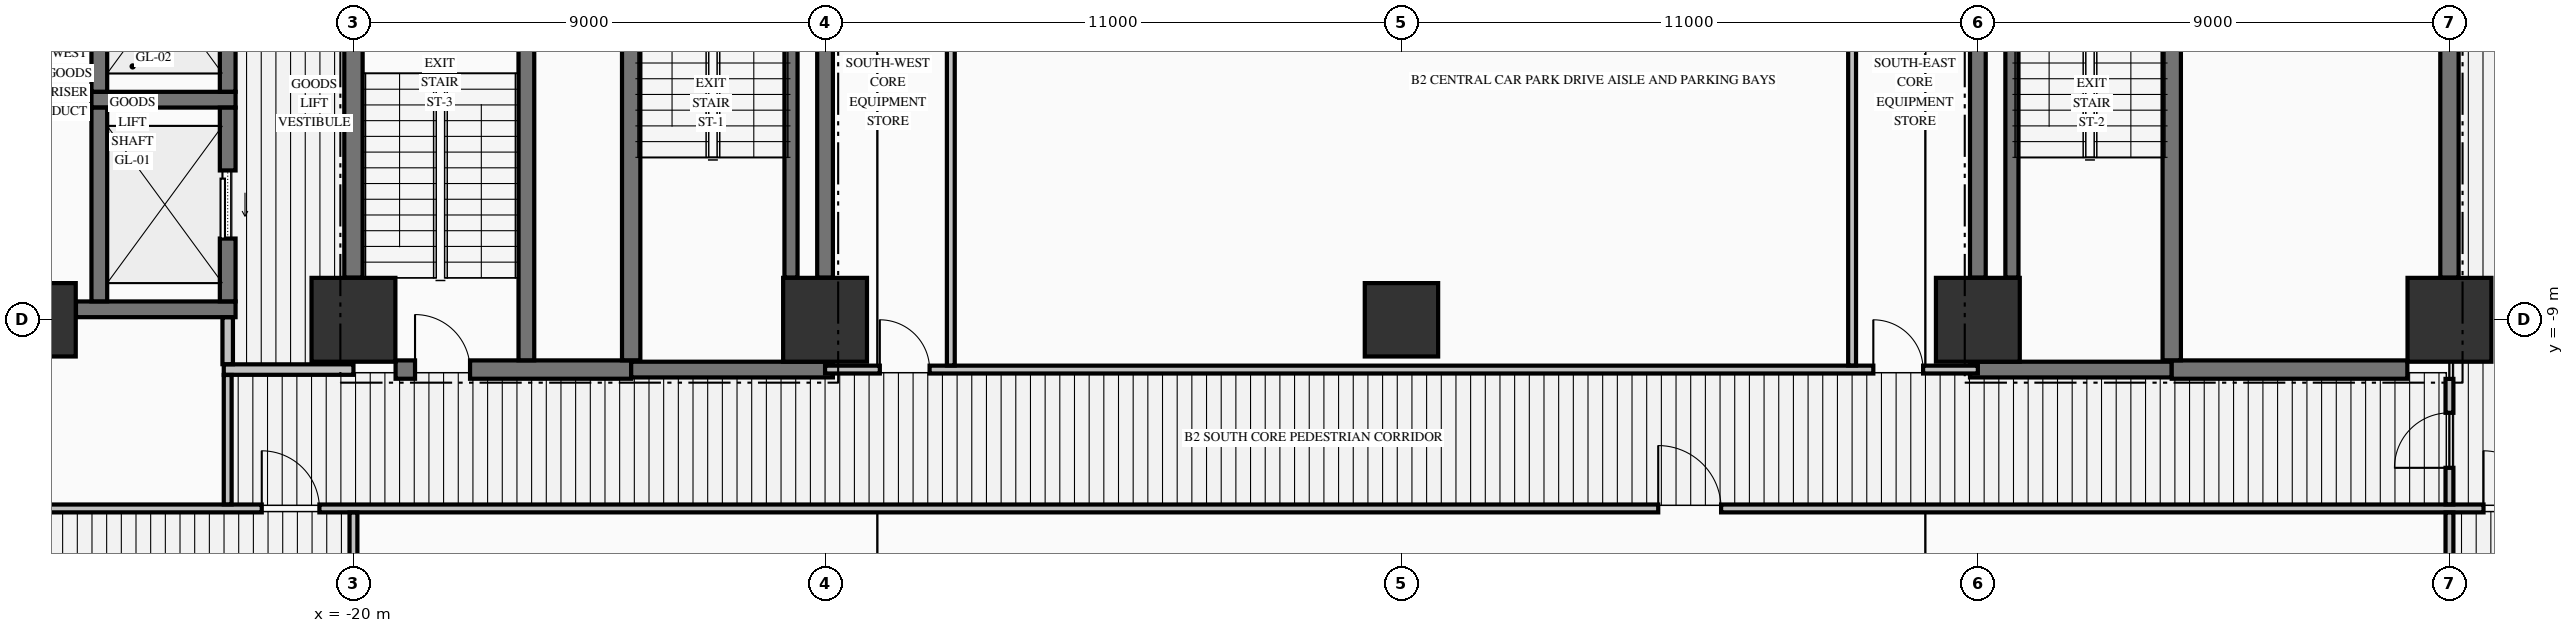
"""IFC4 building model, lengths in metres.
Left out: names, types, materials, properties, quantities, classifications, styles, units other than length and angle.
Written with IfcOpenShell. Run it as: python <this file> out.ifc"""

import sys

from ifc_helpers import new_model, si_unit, direction, frame, frame_2d, origin, origin_2d, place, context, subcontext, project, spatial, rectangle, extrude, element, fill, save


model = new_model("IFC4")
c1 = context("Model", 3, precision=1e-05, world=origin(), true_north=direction((0.0, 1.0)))
c2 = subcontext(c1, "Body", "Model", "MODEL_VIEW")
j1 = project(units=[si_unit("LENGTHUNIT", "METRE"), si_unit("PLANEANGLEUNIT", "RADIAN")], contexts=[c1])
p1 = place(None, origin())
s1 = spatial("IfcSite", under=j1, at=p1, CompositionType="ELEMENT")
p2 = place(p1, origin())
s2 = spatial("IfcBuilding", under=s1, at=p2, CompositionType="ELEMENT")
p3 = place(p2, frame((0.0, 0.0, -9.1)))
s3 = spatial("IfcBuildingStorey", under=s2, at=p3, CompositionType="ELEMENT", Elevation=-9.1)
p4 = place(p3, frame((-26.0, -9.0, -0.45), z_axis=(0.0, 0.0, 1.0), x_axis=(1.0, 0.0, 0.0)))
e1 = element("IfcColumn", 1, at=p4, inside=s3, PredefinedType="COLUMN", context=c2, shape_type="SweptSolid", body=[
    extrude(rectangle(XDim=1.4, YDim=1.4, at=origin_2d()), origin(), (0.0, 0.0, 1.0), 4.65),
])
for number, where, z_axis, x_axis in (
    (2, (-20.0, -9.0, -0.45), (0.0, 0.0, 1.0), (1.0, 0.0, 0.0)),
    (3, (-11.0, -9.0, -0.45), (0.0, 0.0, 1.0), (1.0, 0.0, 0.0)),
):
    element("IfcColumn", number, at=place(p3, frame(where, z_axis=z_axis, x_axis=x_axis)), inside=s3, PredefinedType="COLUMN", context=c2, shape_type="SweptSolid", body=[
        extrude(rectangle(XDim=1.6, YDim=1.6, at=origin_2d()), origin(), (0.0, 0.0, 1.0), 4.65),
    ])
p5 = place(p3, frame((0.0, -9.0, -0.45), z_axis=(0.0, 0.0, 1.0), x_axis=(1.0, 0.0, 0.0)))
e4 = element("IfcColumn", 4, at=p5, inside=s3, PredefinedType="COLUMN", context=c2, shape_type="SweptSolid", body=[
    extrude(rectangle(XDim=1.4, YDim=1.4, at=origin_2d()), origin(), (0.0, 0.0, 1.0), 4.65),
])
for number, where, z_axis, x_axis in (
    (5, (11.0, -9.0, -0.45), (0.0, 0.0, 1.0), (1.0, 0.0, 0.0)),
    (6, (20.0, -9.0, -0.45), (0.0, 0.0, 1.0), (1.0, 0.0, 0.0)),
):
    element("IfcColumn", number, at=place(p3, frame(where, z_axis=z_axis, x_axis=x_axis)), inside=s3, PredefinedType="COLUMN", context=c2, shape_type="SweptSolid", body=[
        extrude(rectangle(XDim=1.6, YDim=1.6, at=origin_2d()), origin(), (0.0, 0.0, 1.0), 4.65),
    ])
p6 = place(p3, frame((-19.196, -9.95, 0.0), z_axis=(0.0, 0.0, 1.0), x_axis=(1.0, 0.0, 0.0)))
e7 = element("IfcWall", 7, at=p6, inside=s3, PredefinedType="SHEAR", context=c2, shape_type="SweptSolid", body=[
    extrude(rectangle(XDim=4.496, YDim=0.35, at=frame_2d((2.248, 0.0))), origin(), (0.0, 0.0, 1.0), 4.2),
])
p7 = place(p6, frame((0.371, 0.0, 0.0)))
e8 = element("IfcOpeningElement", 8, at=p7, cuts=e7, PredefinedType="OPENING", context=c2, shape_type="SweptSolid", body=[
    extrude(rectangle(XDim=1.05, YDim=2.15, at=frame_2d((0.525, 1.075))), frame((0.0, 0.185, 0.0), z_axis=(0.0, -1.0, 0.0), x_axis=(1.0, 0.0, 0.0)), (0.0, 0.0, 1.0), 0.37),
])
for number, where, z_axis, x_axis in (
    (9, (-14.7, -9.95, 0.0), (0.0, 0.0, 1.0), (1.0, 0.0, 0.0)),
    (10, (10.85, -9.95, 0.0), (0.0, 0.0, 1.0), (1.0, 0.0, 0.0)),
):
    element("IfcWall", number, at=place(p3, frame(where, z_axis=z_axis, x_axis=x_axis)), inside=s3, PredefinedType="SHEAR", context=c2, shape_type="SweptSolid", body=[
        extrude(rectangle(XDim=3.85, YDim=0.3, at=frame_2d((1.925, 0.0))), origin(), (0.0, 0.0, 1.0), 4.2),
    ])
p8 = place(p3, frame((14.7, -9.95, 0.0), z_axis=(0.0, 0.0, 1.0), x_axis=(1.0, 0.0, 0.0)))
e11 = element("IfcWall", 11, at=p8, inside=s3, PredefinedType="SHEAR", context=c2, shape_type="SweptSolid", body=[
    extrude(rectangle(XDim=4.496, YDim=0.35, at=frame_2d((2.248, 0.0))), origin(), (0.0, 0.0, 1.0), 4.2),
])
p9 = place(p3, frame((-25.296, -8.8, 0.0), z_axis=(0.0, 0.0, 1.0), x_axis=(1.0, 0.0, 0.0)))
e12 = element("IfcWall", 12, at=p9, inside=s3, PredefinedType="SHEAR", context=c2, shape_type="SweptSolid", body=[
    extrude(rectangle(XDim=3.046, YDim=0.3, at=frame_2d((1.523, 0.0))), origin(), (0.0, 0.0, 1.0), 4.2),
])
p10 = place(p3, frame((-25.0, -4.8, 0.0), z_axis=(0.0, 0.0, 1.0), x_axis=(1.0, 0.0, 0.0)))
e13 = element("IfcWall", 13, at=p10, inside=s3, PredefinedType="SHEAR", context=c2, shape_type="SweptSolid", body=[
    extrude(rectangle(XDim=2.75, YDim=0.3, at=frame_2d((1.375, 0.0))), origin(), (0.0, 0.0, 1.0), 4.2),
])
p11 = place(p3, frame((-33.722, -12.6, 0.0), z_axis=(0.0, 0.0, 1.0), x_axis=(1.0, 0.0, 0.0)))
e14 = element("IfcWall", 14, at=p11, inside=s3, PredefinedType="PARTITIONING", context=c2, shape_type="SweptSolid", body=[
    extrude(rectangle(XDim=56.222, YDim=0.15, at=frame_2d((28.111, 0.0))), origin(), (0.0, 0.0, 1.0), 3.74),
])
p12 = place(p11, frame((11.972, 0.0, 0.0)))
e15 = element("IfcOpeningElement", 15, at=p12, cuts=e14, PredefinedType="OPENING", context=c2, shape_type="SweptSolid", body=[
    extrude(rectangle(XDim=1.1, YDim=2.15, at=frame_2d((0.55, 1.075))), frame((0.0, 0.085, 0.0), z_axis=(0.0, -1.0, 0.0), x_axis=(1.0, 0.0, 0.0)), (0.0, 0.0, 1.0), 0.17),
])
p13 = place(p11, frame((54.372, 0.0, 0.0)))
e16 = element("IfcOpeningElement", 16, at=p13, cuts=e14, PredefinedType="OPENING", context=c2, shape_type="SweptSolid", body=[
    extrude(rectangle(XDim=1.1, YDim=2.15, at=frame_2d((0.55, 1.075))), frame((0.0, 0.085, 0.0), z_axis=(0.0, -1.0, 0.0), x_axis=(1.0, 0.0, 0.0)), (0.0, 0.0, 1.0), 0.17),
])
p14 = place(p11, frame((38.622, 0.0, 0.0)))
e17 = element("IfcOpeningElement", 17, at=p14, cuts=e14, PredefinedType="OPENING", context=c2, shape_type="SweptSolid", body=[
    extrude(rectangle(XDim=1.2, YDim=2.15, at=frame_2d((0.6, 1.075))), frame((0.0, 0.085, 0.0), z_axis=(0.0, -1.0, 0.0), x_axis=(1.0, 0.0, 0.0)), (0.0, 0.0, 1.0), 0.17),
])
p15 = place(p3, frame((-22.475, -9.95, 0.0), z_axis=(0.0, 0.0, 1.0), x_axis=(1.0, 0.0, 0.0)))
e18 = element("IfcWall", 18, at=p15, inside=s3, PredefinedType="PARTITIONING", context=c2, shape_type="SweptSolid", body=[
    extrude(rectangle(XDim=2.475, YDim=0.2, at=frame_2d((1.238, 0.0))), origin(), (0.0, 0.0, 1.0), 4.2),
])
p16 = place(p3, frame((-11.0, -9.95, 0.0), z_axis=(0.0, 0.0, 1.0), x_axis=(1.0, 0.0, 0.0)))
e19 = element("IfcWall", 19, at=p16, inside=s3, PredefinedType="PARTITIONING", context=c2, shape_type="SweptSolid", body=[
    extrude(rectangle(XDim=22.0, YDim=0.15, at=frame_2d((11.0, 0.0))), origin(), (0.0, 0.0, 1.0), 4.2),
])
p17 = place(p16, frame((1.045, 0.0, 0.0)))
e20 = element("IfcOpeningElement", 20, at=p17, cuts=e19, PredefinedType="OPENING", context=c2, shape_type="SweptSolid", body=[
    extrude(rectangle(XDim=0.95, YDim=2.15, at=frame_2d((0.475, 1.075))), frame((0.0, 0.085, 0.0), z_axis=(0.0, -1.0, 0.0), x_axis=(1.0, 0.0, 0.0)), (0.0, 0.0, 1.0), 0.17),
])
p18 = place(p16, frame((20.005, 0.0, 0.0)))
e21 = element("IfcOpeningElement", 21, at=p18, cuts=e19, PredefinedType="OPENING", context=c2, shape_type="SweptSolid", body=[
    extrude(rectangle(XDim=0.95, YDim=2.15, at=frame_2d((0.475, 1.075))), frame((0.0, 0.085, 0.0), z_axis=(0.0, -1.0, 0.0), x_axis=(1.0, 0.0, 0.0)), (0.0, 0.0, 1.0), 0.17),
])
for number, where, z_axis, x_axis in (
    (22, (-24.85, -8.648, 0.0), (0.0, 0.0, 1.0), (0.0, 1.0, 0.0)),
    (23, (-24.85, -4.648, 0.0), (0.0, 0.0, 1.0), (0.0, 1.0, 0.0)),
):
    element("IfcWall", number, at=place(p3, frame(where, z_axis=z_axis, x_axis=x_axis)), inside=s3, PredefinedType="SHEAR", context=c2, shape_type="SweptSolid", body=[
        extrude(rectangle(XDim=3.696, YDim=0.3, at=frame_2d((1.848, 0.0))), origin(), (0.0, 0.0, 1.0), 4.2),
    ])
p19 = place(p3, frame((-22.4, -8.648, 0.0), z_axis=(0.0, 0.0, 1.0), x_axis=(0.0, 1.0, 0.0)))
e24 = element("IfcWall", 24, at=p19, inside=s3, PredefinedType="SHEAR", context=c2, shape_type="SweptSolid", body=[
    extrude(rectangle(XDim=3.696, YDim=0.3, at=frame_2d((1.848, 0.0))), origin(), (0.0, 0.0, 1.0), 4.2),
])
p20 = place(p19, frame((1.198, 0.0, 0.0)))
e25 = element("IfcOpeningElement", 25, at=p20, cuts=e24, PredefinedType="OPENING", context=c2, shape_type="SweptSolid", body=[
    extrude(rectangle(XDim=1.3, YDim=2.3, at=frame_2d((0.65, 1.15))), frame((0.0, 0.16, 0.0), z_axis=(0.0, -1.0, 0.0), x_axis=(1.0, 0.0, 0.0)), (0.0, 0.0, 1.0), 0.32),
])
p21 = place(p3, frame((-22.4, -4.648, 0.0), z_axis=(0.0, 0.0, 1.0), x_axis=(0.0, 1.0, 0.0)))
e26 = element("IfcWall", 26, at=p21, inside=s3, PredefinedType="SHEAR", context=c2, shape_type="SweptSolid", body=[
    extrude(rectangle(XDim=3.696, YDim=0.3, at=frame_2d((1.848, 0.0))), origin(), (0.0, 0.0, 1.0), 4.2),
])
p22 = place(p21, frame((1.198, 0.0, 0.0)))
e27 = element("IfcOpeningElement", 27, at=p22, cuts=e26, PredefinedType="OPENING", context=c2, shape_type="SweptSolid", body=[
    extrude(rectangle(XDim=1.3, YDim=2.3, at=frame_2d((0.65, 1.15))), frame((0.0, 0.16, 0.0), z_axis=(0.0, -1.0, 0.0), x_axis=(1.0, 0.0, 0.0)), (0.0, 0.0, 1.0), 0.32),
])
p23 = place(p3, frame((-20.0, -8.196, 0.0), z_axis=(0.0, 0.0, 1.0), x_axis=(0.0, 1.0, 0.0)))
e28 = element("IfcWall", 28, at=p23, inside=s3, PredefinedType="SHEAR", context=c2, shape_type="SweptSolid", body=[
    extrude(rectangle(XDim=7.392, YDim=0.35, at=frame_2d((3.696, 0.0))), origin(), (0.0, 0.0, 1.0), 4.2),
])
p24 = place(p3, frame((-16.7, -9.773, 0.0), z_axis=(0.0, 0.0, 1.0), x_axis=(0.0, 1.0, 0.0)))
e29 = element("IfcWall", 29, at=p24, inside=s3, PredefinedType="SHEAR", context=c2, shape_type="SweptSolid", body=[
    extrude(rectangle(XDim=9.371, YDim=0.3, at=frame_2d((4.686, 0.0))), origin(), (0.0, 0.0, 1.0), 4.2),
])
p25 = place(p3, frame((-14.7, -9.773, 0.0), z_axis=(0.0, 0.0, 1.0), x_axis=(0.0, 1.0, 0.0)))
e30 = element("IfcWall", 30, at=p25, inside=s3, PredefinedType="SHEAR", context=c2, shape_type="SweptSolid", body=[
    extrude(rectangle(XDim=9.371, YDim=0.35, at=frame_2d((4.686, 0.0))), origin(), (0.0, 0.0, 1.0), 4.2),
])
p26 = place(p3, frame((-11.65, -8.196, 0.0), z_axis=(0.0, 0.0, 1.0), x_axis=(0.0, 1.0, 0.0)))
e31 = element("IfcWall", 31, at=p26, inside=s3, PredefinedType="SOLIDWALL", context=c2, shape_type="SweptSolid", body=[
    extrude(rectangle(XDim=7.392, YDim=0.25, at=frame_2d((3.696, 0.0))), origin(), (0.0, 0.0, 1.0), 4.2),
])
for number, where, z_axis, x_axis in (
    (32, (-11.0, -8.196, 0.0), (0.0, 0.0, 1.0), (0.0, 1.0, 0.0)),
    (33, (11.0, -8.196, 0.0), (0.0, 0.0, 1.0), (0.0, 1.0, 0.0)),
):
    element("IfcWall", number, at=place(p3, frame(where, z_axis=z_axis, x_axis=x_axis)), inside=s3, PredefinedType="SHEAR", context=c2, shape_type="SweptSolid", body=[
        extrude(rectangle(XDim=7.392, YDim=0.3, at=frame_2d((3.696, 0.0))), origin(), (0.0, 0.0, 1.0), 4.2),
    ])
p27 = place(p3, frame((11.65, -8.196, 0.0), z_axis=(0.0, 0.0, 1.0), x_axis=(0.0, 1.0, 0.0)))
e34 = element("IfcWall", 34, at=p27, inside=s3, PredefinedType="SOLIDWALL", context=c2, shape_type="SweptSolid", body=[
    extrude(rectangle(XDim=7.392, YDim=0.25, at=frame_2d((3.696, 0.0))), origin(), (0.0, 0.0, 1.0), 4.2),
])
p28 = place(p3, frame((14.7, -9.773, 0.0), z_axis=(0.0, 0.0, 1.0), x_axis=(0.0, 1.0, 0.0)))
e35 = element("IfcWall", 35, at=p28, inside=s3, PredefinedType="SHEAR", context=c2, shape_type="SweptSolid", body=[
    extrude(rectangle(XDim=9.371, YDim=0.35, at=frame_2d((4.686, 0.0))), origin(), (0.0, 0.0, 1.0), 4.2),
])
p29 = place(p3, frame((20.0, -8.196, 0.0), z_axis=(0.0, 0.0, 1.0), x_axis=(0.0, 1.0, 0.0)))
e36 = element("IfcWall", 36, at=p29, inside=s3, PredefinedType="SHEAR", context=c2, shape_type="SweptSolid", body=[
    extrude(rectangle(XDim=7.392, YDim=0.35, at=frame_2d((3.696, 0.0))), origin(), (0.0, 0.0, 1.0), 4.2),
])
p30 = place(p3, frame((-22.4, -12.522, 0.0), z_axis=(0.0, 0.0, 1.0), x_axis=(0.0, 1.0, 0.0)))
e37 = element("IfcWall", 37, at=p30, inside=s3, PredefinedType="PARTITIONING", context=c2, shape_type="SweptSolid", body=[
    extrude(rectangle(XDim=2.469, YDim=0.15, at=frame_2d((1.234, 0.0))), origin(), (0.0, 0.0, 1.0), 4.2),
])
p31 = place(p3, frame((-22.4, -9.847, 0.0), z_axis=(0.0, 0.0, 1.0), x_axis=(0.0, 1.0, 0.0)))
e38 = element("IfcWall", 38, at=p31, inside=s3, PredefinedType="PARTITIONING", context=c2, shape_type="SweptSolid", body=[
    extrude(rectangle(XDim=0.894, YDim=0.2, at=frame_2d((0.447, 0.0))), origin(), (0.0, 0.0, 1.0), 4.2),
])
p32 = place(p3, frame((-20.0, -15.194, 0.0), z_axis=(0.0, 0.0, 1.0), x_axis=(0.0, 1.0, 0.0)))
e39 = element("IfcWall", 39, at=p32, inside=s3, PredefinedType="PARTITIONING", context=c2, shape_type="SweptSolid", body=[
    extrude(rectangle(XDim=2.516, YDim=0.15, at=frame_2d((1.258, 0.0))), origin(), (0.0, 0.0, 1.0), 4.2),
])
for number, where, z_axis, x_axis in (
    (40, (-8.6, -9.872, 0.0), (0.0, 0.0, 1.0), (0.0, 1.0, 0.0)),
    (41, (8.6, -9.872, 0.0), (0.0, 0.0, 1.0), (0.0, 1.0, 0.0)),
):
    element("IfcWall", number, at=place(p3, frame(where, z_axis=z_axis, x_axis=x_axis)), inside=s3, PredefinedType="PARTITIONING", context=c2, shape_type="SweptSolid", body=[
        extrude(rectangle(XDim=9.266, YDim=0.15, at=frame_2d((4.633, 0.0))), origin(), (0.0, 0.0, 1.0), 4.2),
    ])
p33 = place(p3, frame((20.0, -15.194, 0.0), z_axis=(0.0, 0.0, 1.0), x_axis=(0.0, 1.0, 0.0)))
e42 = element("IfcWall", 42, at=p33, inside=s3, PredefinedType="PARTITIONING", context=c2, shape_type="SweptSolid", body=[
    extrude(rectangle(XDim=2.516, YDim=0.15, at=frame_2d((1.258, 0.0))), origin(), (0.0, 0.0, 1.0), 3.242),
])
p34 = place(p3, frame((20.0, -12.522, 0.0), z_axis=(0.0, 0.0, 1.0), x_axis=(0.0, 1.0, 0.0)))
e43 = element("IfcWall", 43, at=p34, inside=s3, PredefinedType="PARTITIONING", context=c2, shape_type="SweptSolid", body=[
    extrude(rectangle(XDim=2.394, YDim=0.15, at=frame_2d((1.197, 0.0))), origin(), (0.0, 0.0, 1.0), 3.242),
])
p35 = place(p34, frame((0.697, 0.0, 0.0)))
e44 = element("IfcOpeningElement", 44, at=p35, cuts=e43, PredefinedType="OPENING", context=c2, shape_type="SweptSolid", body=[
    extrude(rectangle(XDim=1.05, YDim=2.15, at=frame_2d((0.525, 1.075))), frame((0.0, 0.085, 0.0), z_axis=(0.0, -1.0, 0.0), x_axis=(1.0, 0.0, 0.0)), (0.0, 0.0, 1.0), 0.17),
])
p36 = place(p7, origin())
e45 = element("IfcDoor", 45, at=p36, inside=s3, OperationType="SINGLE_SWING_LEFT", PredefinedType="DOOR", context=c2, shape_type="SweptSolid", body=[
    extrude(rectangle(XDim=1.05, YDim=2.15, at=frame_2d((0.525, 1.075))), frame((0.0, 0.025, 0.0), z_axis=(0.0, -1.0, 0.0), x_axis=(1.0, 0.0, 0.0)), (0.0, 0.0, 1.0), 0.05),
])
fill(e8, e45)
p37 = place(p20, origin())
e46 = element("IfcDoor", 46, at=p37, inside=s3, OperationType="SLIDING_TO_LEFT", PredefinedType="DOOR", context=c2, shape_type="SweptSolid", body=[
    extrude(rectangle(XDim=1.3, YDim=2.3, at=frame_2d((0.65, 1.15))), frame((0.0, 0.025, 0.0), z_axis=(0.0, -1.0, 0.0), x_axis=(1.0, 0.0, 0.0)), (0.0, 0.0, 1.0), 0.05),
])
fill(e25, e46)
p38 = place(p17, origin())
e47 = element("IfcDoor", 47, at=p38, inside=s3, OperationType="SINGLE_SWING_LEFT", PredefinedType="DOOR", context=c2, shape_type="SweptSolid", body=[
    extrude(rectangle(XDim=0.95, YDim=2.15, at=frame_2d((0.475, 1.075))), frame((0.0, 0.025, 0.0), z_axis=(0.0, -1.0, 0.0), x_axis=(1.0, 0.0, 0.0)), (0.0, 0.0, 1.0), 0.05),
])
fill(e20, e47)
p39 = place(p18, origin())
e48 = element("IfcDoor", 48, at=p39, inside=s3, OperationType="SINGLE_SWING_LEFT", PredefinedType="DOOR", context=c2, shape_type="SweptSolid", body=[
    extrude(rectangle(XDim=0.95, YDim=2.15, at=frame_2d((0.475, 1.075))), frame((0.0, 0.025, 0.0), z_axis=(0.0, -1.0, 0.0), x_axis=(1.0, 0.0, 0.0)), (0.0, 0.0, 1.0), 0.05),
])
fill(e21, e48)
p40 = place(p12, origin())
e49 = element("IfcDoor", 49, at=p40, inside=s3, OperationType="SINGLE_SWING_LEFT", PredefinedType="DOOR", context=c2, shape_type="SweptSolid", body=[
    extrude(rectangle(XDim=1.1, YDim=2.15, at=frame_2d((0.55, 1.075))), frame((0.0, 0.025, 0.0), z_axis=(0.0, -1.0, 0.0), x_axis=(1.0, 0.0, 0.0)), (0.0, 0.0, 1.0), 0.05),
])
fill(e15, e49)
p41 = place(p35, origin())
e50 = element("IfcDoor", 50, at=p41, inside=s3, OperationType="SINGLE_SWING_LEFT", PredefinedType="DOOR", context=c2, shape_type="SweptSolid", body=[
    extrude(rectangle(XDim=1.05, YDim=2.15, at=frame_2d((0.525, 1.075))), frame((0.0, 0.025, 0.0), z_axis=(0.0, -1.0, 0.0), x_axis=(1.0, 0.0, 0.0)), (0.0, 0.0, 1.0), 0.05),
])
fill(e44, e50)
p42 = place(p13, origin())
e51 = element("IfcDoor", 51, at=p42, inside=s3, OperationType="SINGLE_SWING_LEFT", PredefinedType="DOOR", context=c2, shape_type="SweptSolid", body=[
    extrude(rectangle(XDim=1.1, YDim=2.15, at=frame_2d((0.55, 1.075))), frame((0.0, 0.025, 0.0), z_axis=(0.0, -1.0, 0.0), x_axis=(1.0, 0.0, 0.0)), (0.0, 0.0, 1.0), 0.05),
])
fill(e16, e51)
p43 = place(p14, origin())
e52 = element("IfcDoor", 52, at=p43, inside=s3, OperationType="SINGLE_SWING_LEFT", PredefinedType="DOOR", context=c2, shape_type="SweptSolid", body=[
    extrude(rectangle(XDim=1.2, YDim=2.15, at=frame_2d((0.6, 1.075))), frame((0.0, 0.025, 0.0), z_axis=(0.0, -1.0, 0.0), x_axis=(1.0, 0.0, 0.0)), (0.0, 0.0, 1.0), 0.05),
])
fill(e17, e52)
save(model, sys.argv[1])
